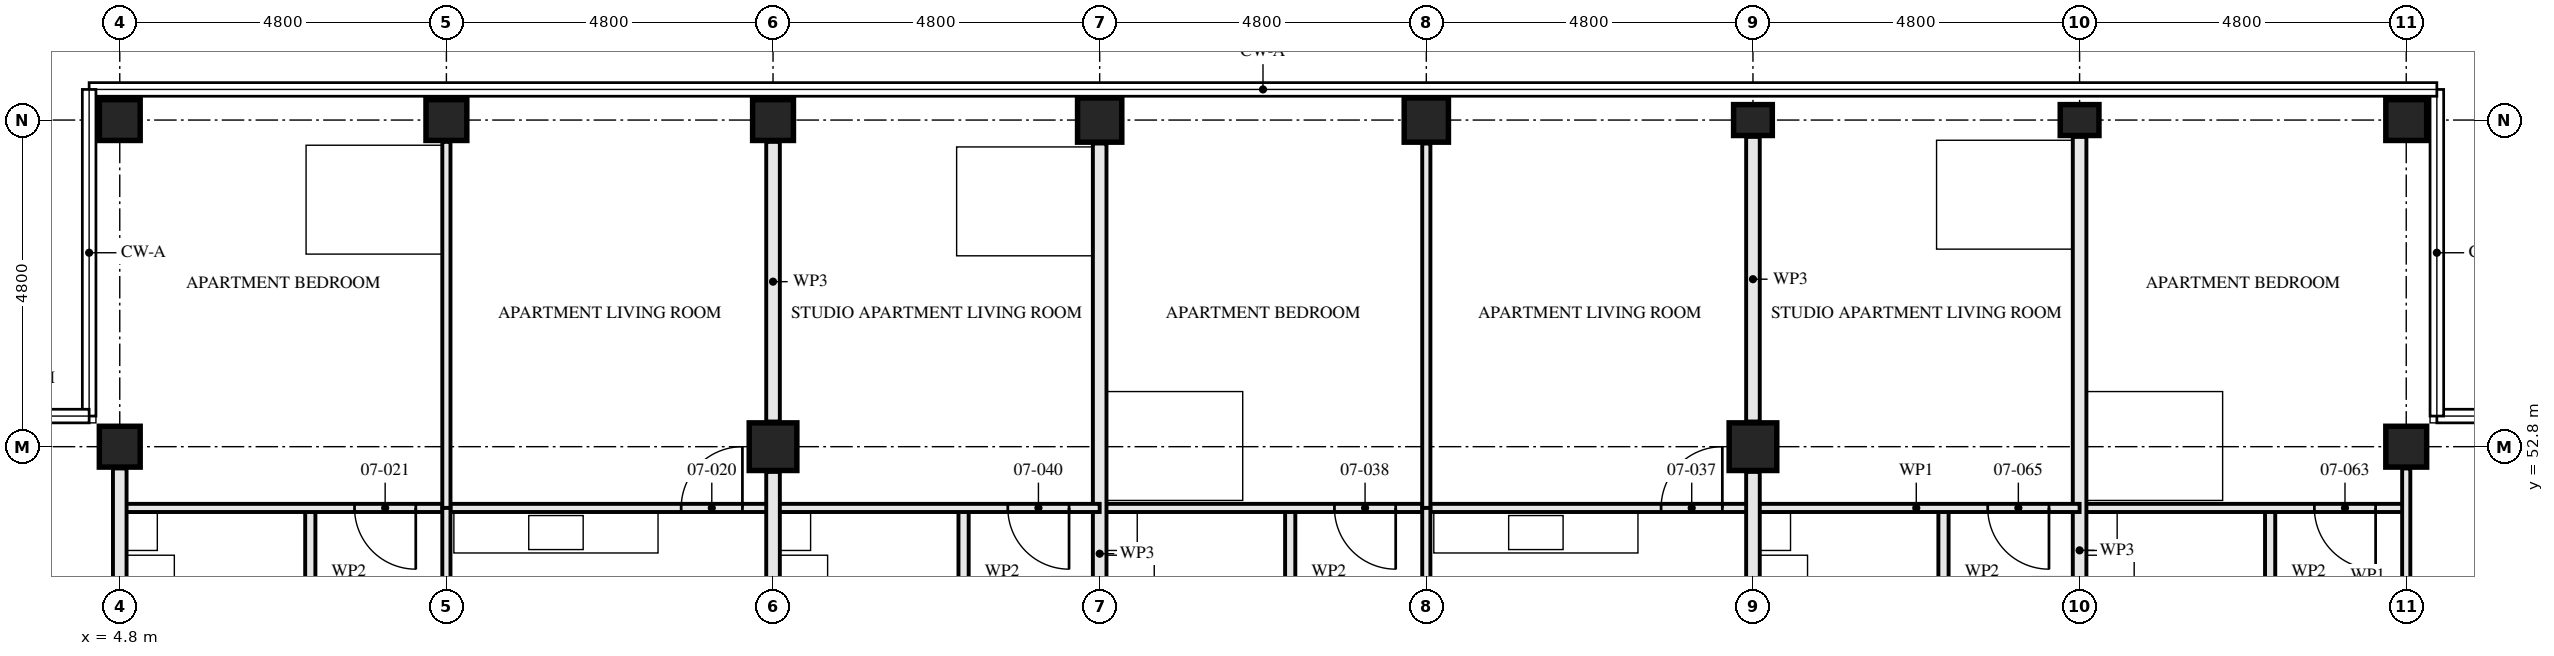
"""IFC4 building model, lengths in metres.
Left out: names, types, materials, properties, quantities, classifications, styles, units other than length and angle.
Written with IfcOpenShell. Run it as: python <this file> out.ifc"""

import sys

from ifc_helpers import new_model, si_unit, direction, frame, frame_2d, origin, origin_2d, place, context, subcontext, project, spatial, rectangle, hollow_rectangle, i_section, extrude, element, fill, save


model = new_model("IFC4")
c1 = context("Model", 3, precision=1e-05, world=origin(), true_north=direction((0.0, 1.0)))
c2 = subcontext(c1, "Body", "Model", "MODEL_VIEW")
j1 = project(units=[si_unit("LENGTHUNIT", "METRE"), si_unit("PLANEANGLEUNIT", "RADIAN")], contexts=[c1])
p1 = place(None, origin())
s1 = spatial("IfcSite", under=j1, at=p1, CompositionType="ELEMENT")
p2 = place(p1, origin())
s2 = spatial("IfcBuilding", under=s1, at=p2, CompositionType="ELEMENT")
p3 = place(p2, frame((0.0, 0.0, 30.5)))
s3 = spatial("IfcBuildingStorey", under=s2, at=p3, CompositionType="ELEMENT", Elevation=30.5)
for number, where, z_axis, x_axis in (
    (1, (4.8, 52.8, 0.0), (0.0, 0.0, 1.0), (0.0, 1.0, 0.0)),
    (2, (4.8, 57.6, 0.0), (0.0, 0.0, 1.0), (0.0, 1.0, 0.0)),
    (3, (9.6, 57.6, 0.0), (0.0, 0.0, 1.0), (0.0, 1.0, 0.0)),
):
    element("IfcColumn", number, at=place(p3, frame(where, z_axis=z_axis, x_axis=x_axis)), inside=s3, PredefinedType="COLUMN", context=c2, shape_type="SweptSolid", body=[
        extrude(hollow_rectangle(XDim=0.6, YDim=0.6, WallThickness=0.08, at=origin_2d()), origin(), (0.0, 0.0, 1.0), 3.5),
    ])
p4 = place(p3, frame((14.4, 52.8, 0.0), z_axis=(0.0, 0.0, 1.0), x_axis=(1.0, 0.0, 0.0)))
e4 = element("IfcColumn", 4, at=p4, inside=s3, PredefinedType="COLUMN", context=c2, shape_type="SweptSolid", body=[
    extrude(hollow_rectangle(XDim=0.7, YDim=0.7, WallThickness=0.06, at=origin_2d()), origin(), (0.0, 0.0, 1.0), 3.5),
])
p5 = place(p3, frame((14.4, 57.6, 0.0), z_axis=(0.0, 0.0, 1.0), x_axis=(0.0, 1.0, 0.0)))
e5 = element("IfcColumn", 5, at=p5, inside=s3, PredefinedType="COLUMN", context=c2, shape_type="SweptSolid", body=[
    extrude(hollow_rectangle(XDim=0.6, YDim=0.6, WallThickness=0.08, at=origin_2d()), origin(), (0.0, 0.0, 1.0), 3.5),
])
for number, where, z_axis, x_axis in (
    (6, (19.2, 57.6, 0.0), (0.0, 0.0, 1.0), (0.0, 1.0, 0.0)),
    (7, (24.0, 57.6, 0.0), (0.0, 0.0, 1.0), (0.0, 1.0, 0.0)),
):
    element("IfcColumn", number, at=place(p3, frame(where, z_axis=z_axis, x_axis=x_axis)), inside=s3, PredefinedType="COLUMN", context=c2, shape_type="SweptSolid", body=[
        extrude(hollow_rectangle(XDim=0.65, YDim=0.65, WallThickness=0.08, at=origin_2d()), origin(), (0.0, 0.0, 1.0), 3.5),
    ])
p6 = place(p3, frame((28.8, 52.8, 0.0), z_axis=(0.0, 0.0, 1.0), x_axis=(1.0, 0.0, 0.0)))
e8 = element("IfcColumn", 8, at=p6, inside=s3, PredefinedType="COLUMN", context=c2, shape_type="SweptSolid", body=[
    extrude(hollow_rectangle(XDim=0.7, YDim=0.7, WallThickness=0.06, at=origin_2d()), origin(), (0.0, 0.0, 1.0), 3.5),
])
for number, where, z_axis, x_axis in (
    (9, (28.8, 57.6, 0.0), (0.0, 0.0, 1.0), (0.0, 1.0, 0.0)),
    (10, (33.6, 57.6, 0.0), (0.0, 0.0, 1.0), (0.0, 1.0, 0.0)),
):
    element("IfcColumn", number, at=place(p3, frame(where, z_axis=z_axis, x_axis=x_axis)), inside=s3, PredefinedType="COLUMN", context=c2, shape_type="SweptSolid", body=[
        extrude(i_section(OverallWidth=0.454, OverallDepth=0.569, WebThickness=0.078, FlangeThickness=0.125, FilletRadius=0.015, at=origin_2d()), origin(), (0.0, 0.0, 1.0), 3.5),
    ])
for number, where, z_axis, x_axis in (
    (11, (38.4, 52.8, 0.0), (0.0, 0.0, 1.0), (0.0, 1.0, 0.0)),
    (12, (38.4, 57.6, 0.0), (0.0, 0.0, 1.0), (0.0, 1.0, 0.0)),
):
    element("IfcColumn", number, at=place(p3, frame(where, z_axis=z_axis, x_axis=x_axis)), inside=s3, PredefinedType="COLUMN", context=c2, shape_type="SweptSolid", body=[
        extrude(hollow_rectangle(XDim=0.6, YDim=0.6, WallThickness=0.05, at=origin_2d()), origin(), (0.0, 0.0, 1.0), 3.5),
    ])
p7 = place(p3, frame((7.6, 51.9, 0.0), z_axis=(0.0, 0.0, 1.0), x_axis=(0.0, -1.0, 0.0)))
e13 = element("IfcWall", 13, at=p7, inside=s3, PredefinedType="PARTITIONING", context=c2, shape_type="SweptSolid", body=[
    extrude(rectangle(XDim=3.0, YDim=0.15, at=frame_2d((1.5, 0.0))), origin(), (0.0, 0.0, 1.0), 3.33),
])
p8 = place(p7, frame((1.05, 0.0, 0.0)))
e14 = element("IfcOpeningElement", 14, at=p8, cuts=e13, PredefinedType="OPENING", context=c2, shape_type="SweptSolid", body=[
    extrude(rectangle(XDim=0.9, YDim=2.1, at=frame_2d((0.45, 1.05))), frame((0.0, 0.085, 0.0), z_axis=(0.0, -1.0, 0.0), x_axis=(1.0, 0.0, 0.0)), (0.0, 0.0, 1.0), 0.171),
])
p9 = place(p3, frame((9.6, 51.9, 0.0), z_axis=(0.0, 0.0, 1.0), x_axis=(0.0, -1.0, 0.0)))
e15 = element("IfcWall", 15, at=p9, inside=s3, PredefinedType="PARTITIONING", context=c2, shape_type="SweptSolid", body=[
    extrude(rectangle(XDim=6.75, YDim=0.12, at=frame_2d((3.375, 0.0))), origin(), (0.0, 0.0, 1.0), 2.55),
])
p10 = place(p9, frame((2.925, 0.0, 0.0)))
e16 = element("IfcOpeningElement", 16, at=p10, cuts=e15, PredefinedType="OPENING", context=c2, shape_type="SweptSolid", body=[
    extrude(rectangle(XDim=0.9, YDim=2.1, at=frame_2d((0.45, 1.05))), frame((0.0, 0.071, 0.0), z_axis=(0.0, -1.0, 0.0), x_axis=(1.0, 0.0, 0.0)), (0.0, 0.0, 1.0), 0.141),
])
p11 = place(p3, frame((14.4, 51.9, 0.0), z_axis=(0.0, 0.0, 1.0), x_axis=(-1.0, 0.0, 0.0)))
e17 = element("IfcWall", 17, at=p11, inside=s3, PredefinedType="PARTITIONING", context=c2, shape_type="SweptSolid", body=[
    extrude(rectangle(XDim=4.8, YDim=0.12, at=frame_2d((2.4, 0.0))), origin(), (0.0, 0.0, 1.0), 3.33),
])
p12 = place(p11, frame((0.45, 0.0, 0.0)))
e18 = element("IfcOpeningElement", 18, at=p12, cuts=e17, PredefinedType="OPENING", context=c2, shape_type="SweptSolid", body=[
    extrude(rectangle(XDim=0.9, YDim=2.1, at=frame_2d((0.45, 1.05))), frame((0.0, 0.071, 0.0), z_axis=(0.0, -1.0, 0.0), x_axis=(1.0, 0.0, 0.0)), (0.0, 0.0, 1.0), 0.141),
])
p13 = place(p3, frame((9.6, 51.9, 0.0), z_axis=(0.0, 0.0, 1.0), x_axis=(-1.0, 0.0, 0.0)))
e19 = element("IfcWall", 19, at=p13, inside=s3, PredefinedType="PARTITIONING", context=c2, shape_type="SweptSolid", body=[
    extrude(rectangle(XDim=4.8, YDim=0.12, at=frame_2d((2.4, 0.0))), origin(), (0.0, 0.0, 1.0), 3.33),
])
p14 = place(p13, frame((0.45, 0.0, 0.0)))
e20 = element("IfcOpeningElement", 20, at=p14, cuts=e19, PredefinedType="OPENING", context=c2, shape_type="SweptSolid", body=[
    extrude(rectangle(XDim=0.9, YDim=2.1, at=frame_2d((0.45, 1.05))), frame((0.0, 0.071, 0.0), z_axis=(0.0, -1.0, 0.0), x_axis=(1.0, 0.0, 0.0)), (0.0, 0.0, 1.0), 0.141),
])
p15 = place(p3, frame((9.6, 57.28, 0.0), z_axis=(0.0, 0.0, 1.0), x_axis=(0.0, -1.0, 0.0)))
e21 = element("IfcWall", 21, at=p15, inside=s3, PredefinedType="PARTITIONING", context=c2, shape_type="SweptSolid", body=[
    extrude(rectangle(XDim=5.38, YDim=0.12, at=frame_2d((2.69, 0.0))), origin(), (0.0, 0.0, 1.0), 2.55),
])
p16 = place(p3, frame((4.8, 52.48, 0.0), z_axis=(0.0, 0.0, 1.0), x_axis=(0.0, -1.0, 0.0)))
e22 = element("IfcWall", 22, at=p16, inside=s3, PredefinedType="PARTITIONING", context=c2, shape_type="SweptSolid", body=[
    extrude(rectangle(XDim=7.28, YDim=0.2, at=frame_2d((3.64, 0.0))), origin(), (0.0, 0.0, 1.0), 2.55),
])
p17 = place(p3, frame((22.0, 51.9, 0.0), z_axis=(0.0, 0.0, 1.0), x_axis=(0.0, -1.0, 0.0)))
e23 = element("IfcWall", 23, at=p17, inside=s3, PredefinedType="PARTITIONING", context=c2, shape_type="SweptSolid", body=[
    extrude(rectangle(XDim=3.0, YDim=0.15, at=frame_2d((1.5, 0.0))), origin(), (0.0, 0.0, 1.0), 3.33),
])
p18 = place(p17, frame((1.05, 0.0, 0.0)))
e24 = element("IfcOpeningElement", 24, at=p18, cuts=e23, PredefinedType="OPENING", context=c2, shape_type="SweptSolid", body=[
    extrude(rectangle(XDim=0.9, YDim=2.1, at=frame_2d((0.45, 1.05))), frame((0.0, 0.085, 0.0), z_axis=(0.0, -1.0, 0.0), x_axis=(1.0, 0.0, 0.0)), (0.0, 0.0, 1.0), 0.171),
])
p19 = place(p3, frame((24.0, 51.9, 0.0), z_axis=(0.0, 0.0, 1.0), x_axis=(0.0, -1.0, 0.0)))
e25 = element("IfcWall", 25, at=p19, inside=s3, PredefinedType="PARTITIONING", context=c2, shape_type="SweptSolid", body=[
    extrude(rectangle(XDim=6.75, YDim=0.12, at=frame_2d((3.375, 0.0))), origin(), (0.0, 0.0, 1.0), 2.55),
])
p20 = place(p19, frame((2.925, 0.0, 0.0)))
e26 = element("IfcOpeningElement", 26, at=p20, cuts=e25, PredefinedType="OPENING", context=c2, shape_type="SweptSolid", body=[
    extrude(rectangle(XDim=0.9, YDim=2.1, at=frame_2d((0.45, 1.05))), frame((0.0, 0.071, 0.0), z_axis=(0.0, -1.0, 0.0), x_axis=(1.0, 0.0, 0.0)), (0.0, 0.0, 1.0), 0.141),
])
p21 = place(p3, frame((28.8, 51.9, 0.0), z_axis=(0.0, 0.0, 1.0), x_axis=(-1.0, 0.0, 0.0)))
e27 = element("IfcWall", 27, at=p21, inside=s3, PredefinedType="PARTITIONING", context=c2, shape_type="SweptSolid", body=[
    extrude(rectangle(XDim=4.8, YDim=0.12, at=frame_2d((2.4, 0.0))), origin(), (0.0, 0.0, 1.0), 3.33),
])
p22 = place(p21, frame((0.45, 0.0, 0.0)))
e28 = element("IfcOpeningElement", 28, at=p22, cuts=e27, PredefinedType="OPENING", context=c2, shape_type="SweptSolid", body=[
    extrude(rectangle(XDim=0.9, YDim=2.1, at=frame_2d((0.45, 1.05))), frame((0.0, 0.071, 0.0), z_axis=(0.0, -1.0, 0.0), x_axis=(1.0, 0.0, 0.0)), (0.0, 0.0, 1.0), 0.141),
])
p23 = place(p3, frame((24.0, 51.9, 0.0), z_axis=(0.0, 0.0, 1.0), x_axis=(-1.0, 0.0, 0.0)))
e29 = element("IfcWall", 29, at=p23, inside=s3, PredefinedType="PARTITIONING", context=c2, shape_type="SweptSolid", body=[
    extrude(rectangle(XDim=4.8, YDim=0.12, at=frame_2d((2.4, 0.0))), origin(), (0.0, 0.0, 1.0), 3.33),
])
p24 = place(p23, frame((0.45, 0.0, 0.0)))
e30 = element("IfcOpeningElement", 30, at=p24, cuts=e29, PredefinedType="OPENING", context=c2, shape_type="SweptSolid", body=[
    extrude(rectangle(XDim=0.9, YDim=2.1, at=frame_2d((0.45, 1.05))), frame((0.0, 0.071, 0.0), z_axis=(0.0, -1.0, 0.0), x_axis=(1.0, 0.0, 0.0)), (0.0, 0.0, 1.0), 0.141),
])
p25 = place(p3, frame((24.0, 57.255, 0.0), z_axis=(0.0, 0.0, 1.0), x_axis=(0.0, -1.0, 0.0)))
e31 = element("IfcWall", 31, at=p25, inside=s3, PredefinedType="PARTITIONING", context=c2, shape_type="SweptSolid", body=[
    extrude(rectangle(XDim=5.355, YDim=0.12, at=frame_2d((2.677, 0.0))), origin(), (0.0, 0.0, 1.0), 2.55),
])
p26 = place(p3, frame((19.2, 57.255, 0.0), z_axis=(0.0, 0.0, 1.0), x_axis=(0.0, -1.0, 0.0)))
e32 = element("IfcWall", 32, at=p26, inside=s3, PredefinedType="PARTITIONING", context=c2, shape_type="SweptSolid", body=[
    extrude(rectangle(XDim=12.055, YDim=0.2, at=frame_2d((6.027, 0.0))), origin(), (0.0, 0.0, 1.0), 2.55),
])
p27 = place(p3, frame((17.2, 51.9, 0.0), z_axis=(0.0, 0.0, 1.0), x_axis=(0.0, -1.0, 0.0)))
e33 = element("IfcWall", 33, at=p27, inside=s3, PredefinedType="PARTITIONING", context=c2, shape_type="SweptSolid", body=[
    extrude(rectangle(XDim=3.0, YDim=0.15, at=frame_2d((1.5, 0.0))), origin(), (0.0, 0.0, 1.0), 3.33),
])
p28 = place(p27, frame((1.05, 0.0, 0.0)))
e34 = element("IfcOpeningElement", 34, at=p28, cuts=e33, PredefinedType="OPENING", context=c2, shape_type="SweptSolid", body=[
    extrude(rectangle(XDim=0.9, YDim=2.1, at=frame_2d((0.45, 1.05))), frame((0.0, 0.085, 0.0), z_axis=(0.0, -1.0, 0.0), x_axis=(1.0, 0.0, 0.0)), (0.0, 0.0, 1.0), 0.171),
])
p29 = place(p3, frame((19.2, 51.9, 0.0), z_axis=(0.0, 0.0, 1.0), x_axis=(-1.0, 0.0, 0.0)))
e35 = element("IfcWall", 35, at=p29, inside=s3, PredefinedType="PARTITIONING", context=c2, shape_type="SweptSolid", body=[
    extrude(rectangle(XDim=4.8, YDim=0.12, at=frame_2d((2.4, 0.0))), origin(), (0.0, 0.0, 1.0), 3.33),
])
p30 = place(p29, frame((0.45, 0.0, 0.0)))
e36 = element("IfcOpeningElement", 36, at=p30, cuts=e35, PredefinedType="OPENING", context=c2, shape_type="SweptSolid", body=[
    extrude(rectangle(XDim=0.9, YDim=2.1, at=frame_2d((0.45, 1.05))), frame((0.0, 0.071, 0.0), z_axis=(0.0, -1.0, 0.0), x_axis=(1.0, 0.0, 0.0)), (0.0, 0.0, 1.0), 0.141),
])
p31 = place(p3, frame((36.4, 51.9, 0.0), z_axis=(0.0, 0.0, 1.0), x_axis=(0.0, -1.0, 0.0)))
e37 = element("IfcWall", 37, at=p31, inside=s3, PredefinedType="PARTITIONING", context=c2, shape_type="SweptSolid", body=[
    extrude(rectangle(XDim=3.0, YDim=0.15, at=frame_2d((1.5, 0.0))), origin(), (0.0, 0.0, 1.0), 3.33),
])
p32 = place(p31, frame((1.05, 0.0, 0.0)))
e38 = element("IfcOpeningElement", 38, at=p32, cuts=e37, PredefinedType="OPENING", context=c2, shape_type="SweptSolid", body=[
    extrude(rectangle(XDim=0.9, YDim=2.1, at=frame_2d((0.45, 1.05))), frame((0.0, 0.085, 0.0), z_axis=(0.0, -1.0, 0.0), x_axis=(1.0, 0.0, 0.0)), (0.0, 0.0, 1.0), 0.171),
])
p33 = place(p3, frame((38.4, 51.9, 0.0), z_axis=(0.0, 0.0, 1.0), x_axis=(-1.0, 0.0, 0.0)))
e39 = element("IfcWall", 39, at=p33, inside=s3, PredefinedType="PARTITIONING", context=c2, shape_type="SweptSolid", body=[
    extrude(rectangle(XDim=4.8, YDim=0.12, at=frame_2d((2.4, 0.0))), origin(), (0.0, 0.0, 1.0), 3.33),
])
p34 = place(p33, frame((0.45, 0.0, 0.0)))
e40 = element("IfcOpeningElement", 40, at=p34, cuts=e39, PredefinedType="OPENING", context=c2, shape_type="SweptSolid", body=[
    extrude(rectangle(XDim=0.9, YDim=2.1, at=frame_2d((0.45, 1.05))), frame((0.0, 0.071, 0.0), z_axis=(0.0, -1.0, 0.0), x_axis=(1.0, 0.0, 0.0)), (0.0, 0.0, 1.0), 0.141),
])
p35 = place(p3, frame((38.4, 52.48, 0.0), z_axis=(0.0, 0.0, 1.0), x_axis=(0.0, -1.0, 0.0)))
e41 = element("IfcWall", 41, at=p35, inside=s3, PredefinedType="PARTITIONING", context=c2, shape_type="SweptSolid", body=[
    extrude(rectangle(XDim=4.28, YDim=0.12, at=frame_2d((2.14, 0.0))), origin(), (0.0, 0.0, 1.0), 3.33),
])
p36 = place(p3, frame((33.6, 57.353, 0.0), z_axis=(0.0, 0.0, 1.0), x_axis=(0.0, -1.0, 0.0)))
e42 = element("IfcWall", 42, at=p36, inside=s3, PredefinedType="PARTITIONING", context=c2, shape_type="SweptSolid", body=[
    extrude(rectangle(XDim=12.153, YDim=0.2, at=frame_2d((6.077, 0.0))), origin(), (0.0, 0.0, 1.0), 2.55),
])
p37 = place(p3, frame((31.6, 51.9, 0.0), z_axis=(0.0, 0.0, 1.0), x_axis=(0.0, -1.0, 0.0)))
e43 = element("IfcWall", 43, at=p37, inside=s3, PredefinedType="PARTITIONING", context=c2, shape_type="SweptSolid", body=[
    extrude(rectangle(XDim=3.0, YDim=0.15, at=frame_2d((1.5, 0.0))), origin(), (0.0, 0.0, 1.0), 3.33),
])
p38 = place(p37, frame((1.05, 0.0, 0.0)))
e44 = element("IfcOpeningElement", 44, at=p38, cuts=e43, PredefinedType="OPENING", context=c2, shape_type="SweptSolid", body=[
    extrude(rectangle(XDim=0.9, YDim=2.1, at=frame_2d((0.45, 1.05))), frame((0.0, 0.085, 0.0), z_axis=(0.0, -1.0, 0.0), x_axis=(1.0, 0.0, 0.0)), (0.0, 0.0, 1.0), 0.171),
])
p39 = place(p3, frame((33.6, 51.9, 0.0), z_axis=(0.0, 0.0, 1.0), x_axis=(-1.0, 0.0, 0.0)))
e45 = element("IfcWall", 45, at=p39, inside=s3, PredefinedType="PARTITIONING", context=c2, shape_type="SweptSolid", body=[
    extrude(rectangle(XDim=4.8, YDim=0.12, at=frame_2d((2.4, 0.0))), origin(), (0.0, 0.0, 1.0), 3.33),
])
p40 = place(p39, frame((0.45, 0.0, 0.0)))
e46 = element("IfcOpeningElement", 46, at=p40, cuts=e45, PredefinedType="OPENING", context=c2, shape_type="SweptSolid", body=[
    extrude(rectangle(XDim=0.9, YDim=2.1, at=frame_2d((0.45, 1.05))), frame((0.0, 0.071, 0.0), z_axis=(0.0, -1.0, 0.0), x_axis=(1.0, 0.0, 0.0)), (0.0, 0.0, 1.0), 0.141),
])
p41 = place(p3, frame((14.4, 48.37, 0.0), z_axis=(0.0, 0.0, 1.0), x_axis=(0.0, 1.0, 0.0)))
e47 = element("IfcWall", 47, at=p41, inside=s3, PredefinedType="PARTITIONING", context=c2, shape_type="SweptSolid", body=[
    extrude(rectangle(XDim=4.06, YDim=0.2, at=frame_2d((2.03, 0.0))), origin(), (0.0, 0.0, 1.0), 2.32),
])
p42 = place(p3, frame((14.4, 53.17, 0.0), z_axis=(0.0, 0.0, 1.0), x_axis=(0.0, 1.0, 0.0)))
e48 = element("IfcWall", 48, at=p42, inside=s3, PredefinedType="PARTITIONING", context=c2, shape_type="SweptSolid", body=[
    extrude(rectangle(XDim=4.11, YDim=0.2, at=frame_2d((2.055, 0.0))), origin(), (0.0, 0.0, 1.0), 2.32),
])
p43 = place(p3, frame((28.8, 48.37, 0.0), z_axis=(0.0, 0.0, 1.0), x_axis=(0.0, 1.0, 0.0)))
e49 = element("IfcWall", 49, at=p43, inside=s3, PredefinedType="PARTITIONING", context=c2, shape_type="SweptSolid", body=[
    extrude(rectangle(XDim=4.06, YDim=0.2, at=frame_2d((2.03, 0.0))), origin(), (0.0, 0.0, 1.0), 2.32),
])
p44 = place(p3, frame((28.8, 53.17, 0.0), z_axis=(0.0, 0.0, 1.0), x_axis=(0.0, 1.0, 0.0)))
e50 = element("IfcWall", 50, at=p44, inside=s3, PredefinedType="PARTITIONING", context=c2, shape_type="SweptSolid", body=[
    extrude(rectangle(XDim=4.183, YDim=0.2, at=frame_2d((2.092, 0.0))), origin(), (0.0, 0.0, 1.0), 2.32),
])
p45 = place(p12, frame((0.9, 0.0, 0.0), z_axis=(0.0, 0.0, 1.0), x_axis=(-1.0, 0.0, 0.0)))
e51 = element("IfcDoor", 51, at=p45, inside=s3, OperationType="SINGLE_SWING_LEFT", PredefinedType="DOOR", context=c2, shape_type="SweptSolid", body=[
    extrude(rectangle(XDim=0.9, YDim=2.1, at=frame_2d((0.45, 1.05))), frame((0.0, 0.022, 0.0), z_axis=(0.0, -1.0, 0.0), x_axis=(1.0, 0.0, 0.0)), (0.0, 0.0, 1.0), 0.044),
])
fill(e18, e51)
p46 = place(p14, origin())
e52 = element("IfcDoor", 52, at=p46, inside=s3, OperationType="SINGLE_SWING_RIGHT", PredefinedType="DOOR", context=c2, shape_type="SweptSolid", body=[
    extrude(rectangle(XDim=0.9, YDim=2.1, at=frame_2d((0.45, 1.05))), frame((0.0, 0.022, 0.0), z_axis=(0.0, -1.0, 0.0), x_axis=(1.0, 0.0, 0.0)), (0.0, 0.0, 1.0), 0.044),
])
fill(e20, e52)
p47 = place(p22, frame((0.9, 0.0, 0.0), z_axis=(0.0, 0.0, 1.0), x_axis=(-1.0, 0.0, 0.0)))
e53 = element("IfcDoor", 53, at=p47, inside=s3, OperationType="SINGLE_SWING_LEFT", PredefinedType="DOOR", context=c2, shape_type="SweptSolid", body=[
    extrude(rectangle(XDim=0.9, YDim=2.1, at=frame_2d((0.45, 1.05))), frame((0.0, 0.022, 0.0), z_axis=(0.0, -1.0, 0.0), x_axis=(1.0, 0.0, 0.0)), (0.0, 0.0, 1.0), 0.044),
])
fill(e28, e53)
p48 = place(p24, origin())
e54 = element("IfcDoor", 54, at=p48, inside=s3, OperationType="SINGLE_SWING_RIGHT", PredefinedType="DOOR", context=c2, shape_type="SweptSolid", body=[
    extrude(rectangle(XDim=0.9, YDim=2.1, at=frame_2d((0.45, 1.05))), frame((0.0, 0.022, 0.0), z_axis=(0.0, -1.0, 0.0), x_axis=(1.0, 0.0, 0.0)), (0.0, 0.0, 1.0), 0.044),
])
fill(e30, e54)
p49 = place(p30, origin())
e55 = element("IfcDoor", 55, at=p49, inside=s3, OperationType="SINGLE_SWING_RIGHT", PredefinedType="DOOR", context=c2, shape_type="SweptSolid", body=[
    extrude(rectangle(XDim=0.9, YDim=2.1, at=frame_2d((0.45, 1.05))), frame((0.0, 0.022, 0.0), z_axis=(0.0, -1.0, 0.0), x_axis=(1.0, 0.0, 0.0)), (0.0, 0.0, 1.0), 0.044),
])
fill(e36, e55)
p50 = place(p34, origin())
e56 = element("IfcDoor", 56, at=p50, inside=s3, OperationType="SINGLE_SWING_RIGHT", PredefinedType="DOOR", context=c2, shape_type="SweptSolid", body=[
    extrude(rectangle(XDim=0.9, YDim=2.1, at=frame_2d((0.45, 1.05))), frame((0.0, 0.022, 0.0), z_axis=(0.0, -1.0, 0.0), x_axis=(1.0, 0.0, 0.0)), (0.0, 0.0, 1.0), 0.044),
])
fill(e40, e56)
p51 = place(p40, origin())
e57 = element("IfcDoor", 57, at=p51, inside=s3, OperationType="SINGLE_SWING_RIGHT", PredefinedType="DOOR", context=c2, shape_type="SweptSolid", body=[
    extrude(rectangle(XDim=0.9, YDim=2.1, at=frame_2d((0.45, 1.05))), frame((0.0, 0.022, 0.0), z_axis=(0.0, -1.0, 0.0), x_axis=(1.0, 0.0, 0.0)), (0.0, 0.0, 1.0), 0.044),
])
fill(e46, e57)
save(model, sys.argv[1])
